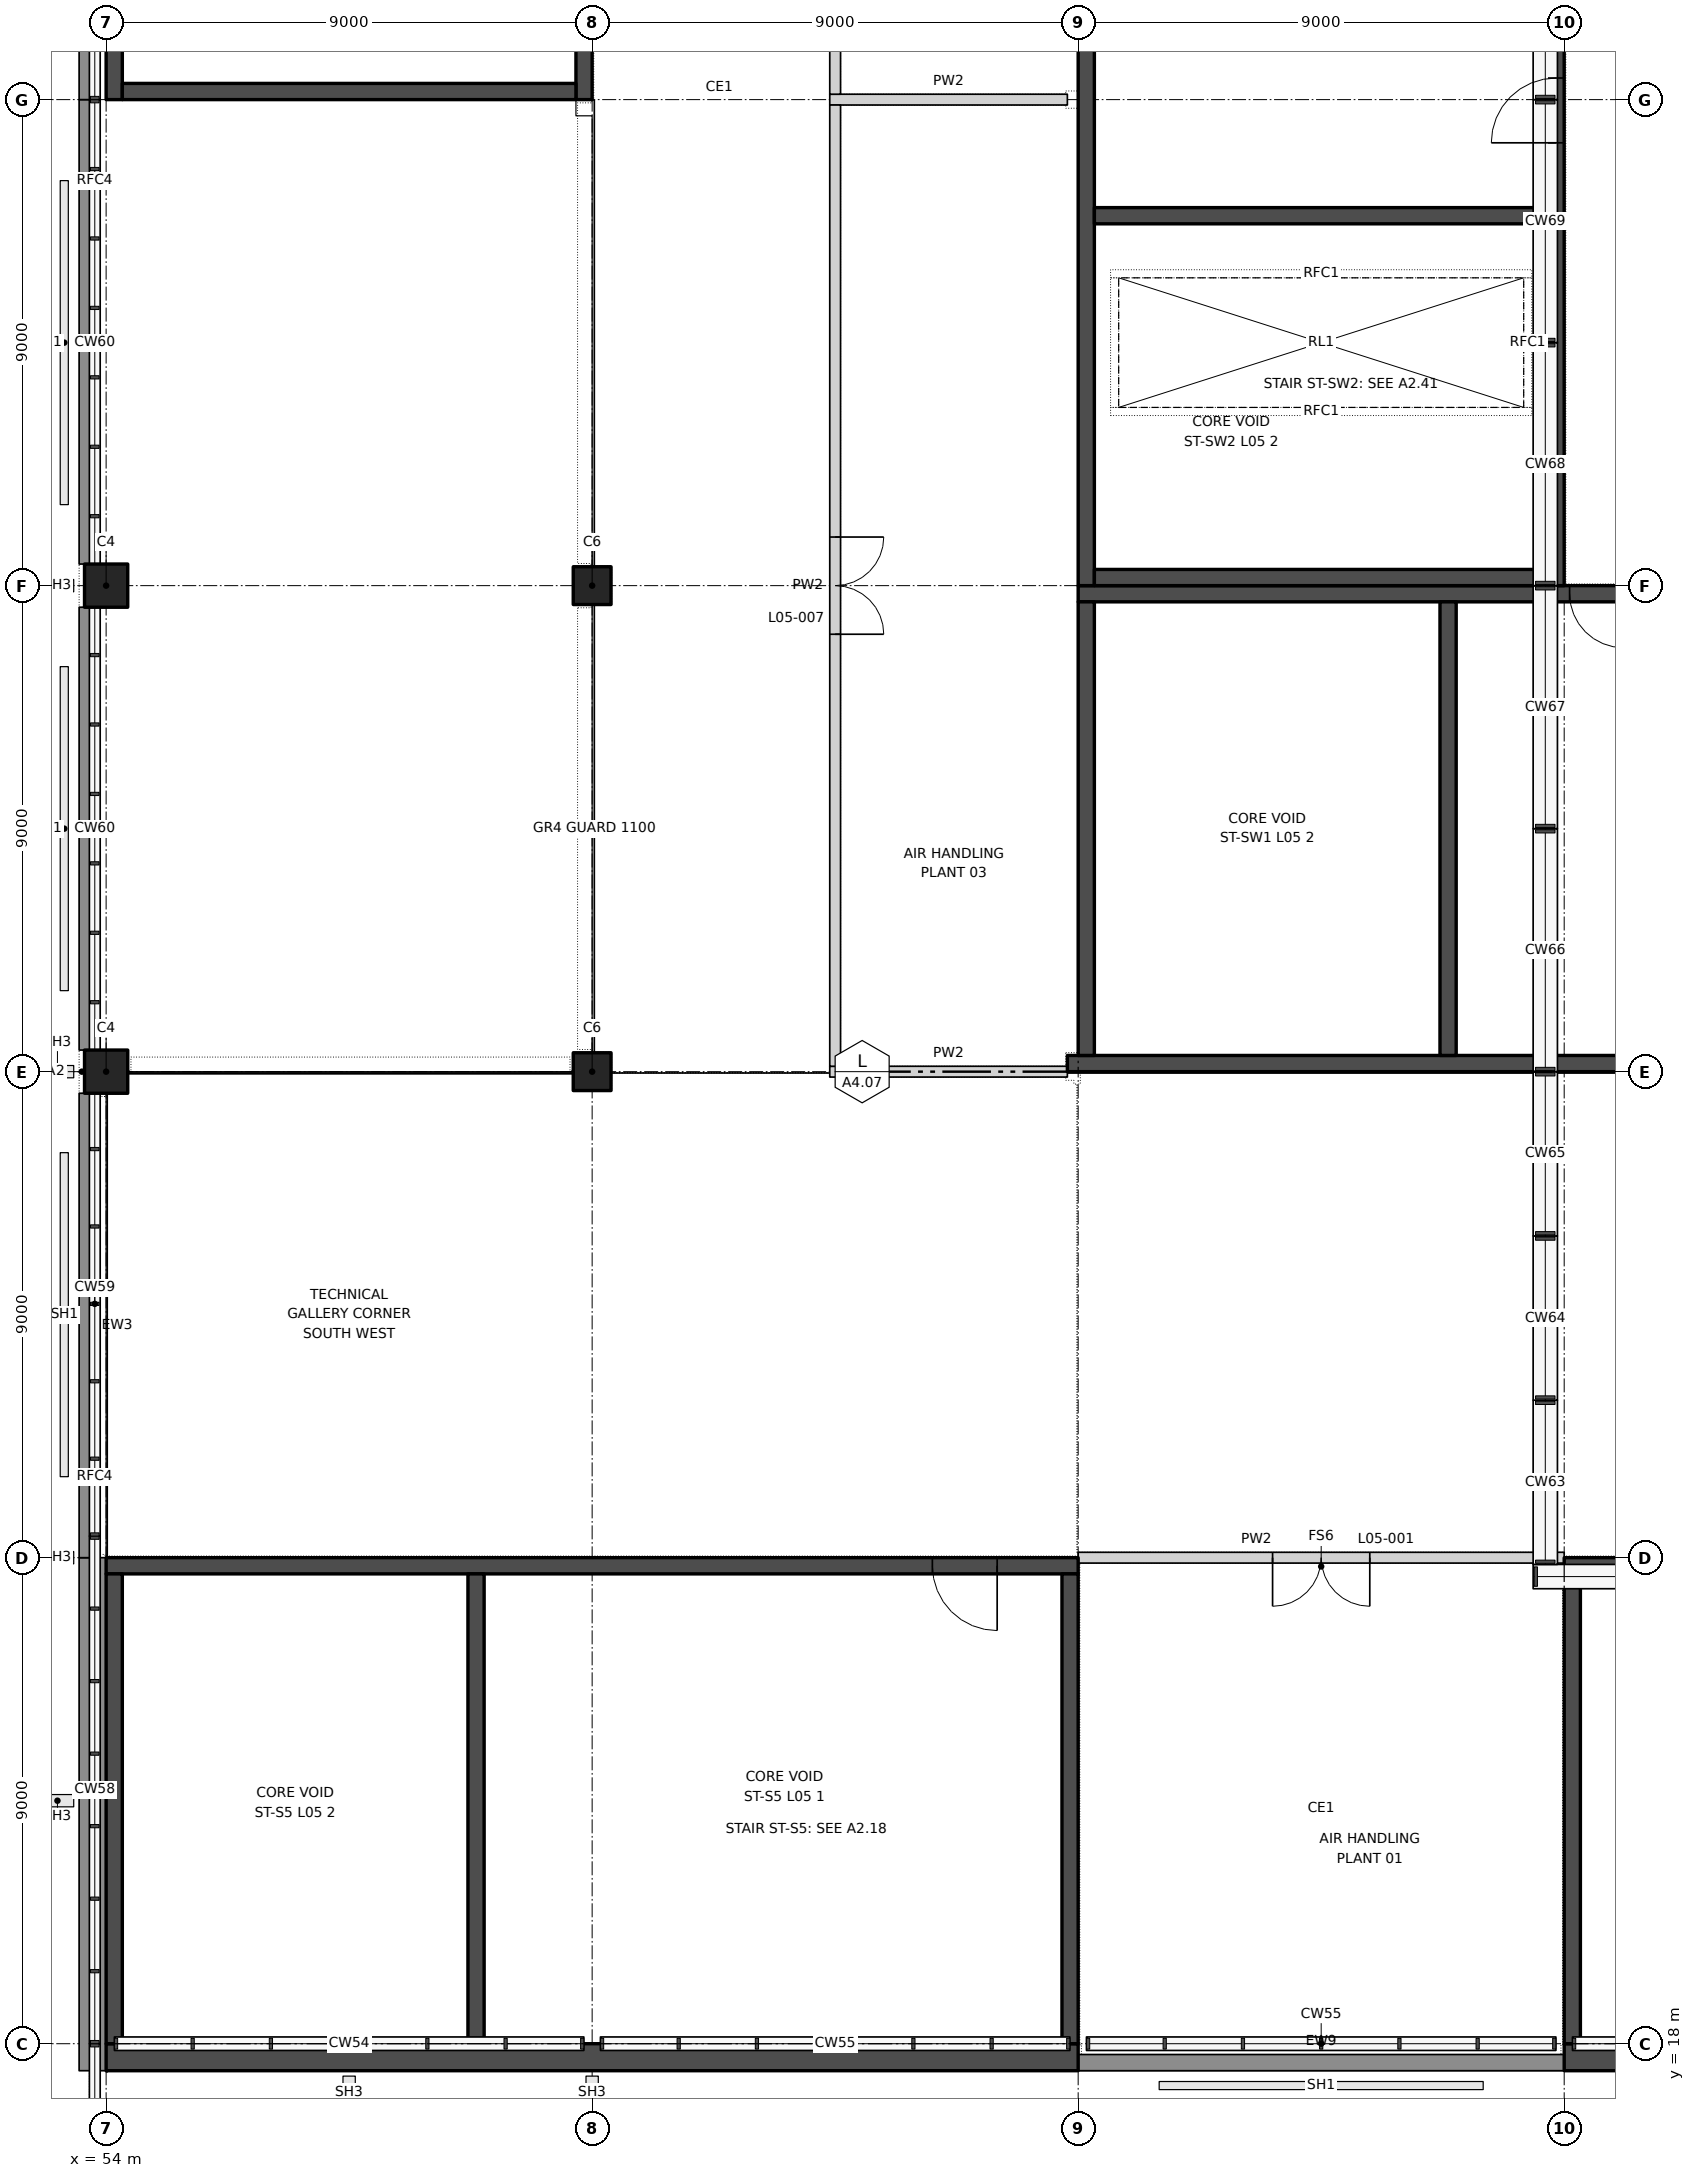
"""IFC4 building model, lengths in metres.
Left out: names, types, materials, properties, quantities, classifications, styles, units other than length and angle.
Written with IfcOpenShell. Run it as: python <this file> out.ifc"""

import sys

from ifc_helpers import new_model, si_unit, direction, frame, frame_2d, origin, origin_2d, place, context, subcontext, project, spatial, rectangle, extrude, element, fill, save


model = new_model("IFC4")
c1 = context("Model", 3, precision=1e-05, world=origin(), true_north=direction((0.0, 1.0)))
c2 = subcontext(c1, "Body", "Model", "MODEL_VIEW")
j1 = project(units=[si_unit("LENGTHUNIT", "METRE"), si_unit("PLANEANGLEUNIT", "RADIAN")], contexts=[c1])
p1 = place(None, origin())
s1 = spatial("IfcSite", under=j1, at=p1, CompositionType="ELEMENT")
p2 = place(p1, origin())
s2 = spatial("IfcBuilding", under=s1, at=p2, CompositionType="ELEMENT")
p3 = place(p2, frame((0.0, 0.0, 33.5)))
s3 = spatial("IfcBuildingStorey", under=s2, at=p3, CompositionType="ELEMENT", Elevation=33.5)
for number, where, z_axis, x_axis in (
    (1, (54.0, 36.0, 0.0), (0.0, 0.0, 1.0), (1.0, 0.0, 0.0)),
    (2, (54.0, 45.0, 0.0), (0.0, 0.0, 1.0), (1.0, 0.0, 0.0)),
):
    element("IfcColumn", number, at=place(p3, frame(where, z_axis=z_axis, x_axis=x_axis)), inside=s3, PredefinedType="COLUMN", context=c2, shape_type="SweptSolid", body=[
        extrude(rectangle(XDim=0.8, YDim=0.8, at=origin_2d()), origin(), (0.0, 0.0, 1.0), 4.0),
    ])
for number, where, z_axis, x_axis in (
    (3, (63.0, 36.0, 0.0), (0.0, 0.0, 1.0), (1.0, 0.0, 0.0)),
    (4, (63.0, 45.0, 0.0), (0.0, 0.0, 1.0), (1.0, 0.0, 0.0)),
):
    element("IfcColumn", number, at=place(p3, frame(where, z_axis=z_axis, x_axis=x_axis)), inside=s3, PredefinedType="COLUMN", context=c2, shape_type="SweptSolid", body=[
        extrude(rectangle(XDim=0.7, YDim=0.7, at=origin_2d()), origin(), (0.0, 0.0, 1.0), 4.0),
    ])
p4 = place(p2, frame((0.0, 0.0, 28.0)))
s4 = spatial("IfcBuildingStorey", under=s2, at=p4, CompositionType="ELEMENT", Elevation=28.0)
p5 = place(p4, frame((54.4, 45.0, 0.0), z_axis=(0.0, 0.0, 1.0), x_axis=(1.0, 0.0, 0.0)))
e5 = element("IfcWall", 5, at=p5, inside=s4, PredefinedType="PARTITIONING", context=c2, shape_type="SweptSolid", body=[
    extrude(rectangle(XDim=8.25, YDim=0.15, at=frame_2d((4.125, 0.0))), origin(), (0.0, 0.0, 1.0), 9.5),
])
p6 = place(p3, frame((72.0, 27.0, 0.0), z_axis=(0.0, 0.0, 1.0), x_axis=(1.0, 0.0, 0.0)))
e6 = element("IfcWall", 6, at=p6, inside=s3, PredefinedType="PARTITIONING", context=c2, shape_type="SweptSolid", body=[
    extrude(rectangle(XDim=9.0, YDim=0.2, at=frame_2d((4.5, 0.0))), origin(), (0.0, 0.0, 1.0), 4.0),
])
p7 = place(p6, frame((3.6, 0.0, 0.0)))
e7 = element("IfcOpeningElement", 7, at=p7, cuts=e6, PredefinedType="OPENING", context=c2, shape_type="SweptSolid", body=[
    extrude(rectangle(XDim=1.8, YDim=2.1, at=frame_2d((0.9, 1.05))), frame((0.0, 0.11, 0.0), z_axis=(0.0, -1.0, 0.0), x_axis=(1.0, 0.0, 0.0)), (0.0, 0.0, 1.0), 0.22),
])
for number, where, z_axis, x_axis in (
    (8, (67.4, 36.0, 0.0), (0.0, 0.0, 1.0), (1.0, 0.0, 0.0)),
    (9, (67.4, 54.0, 0.0), (0.0, 0.0, 1.0), (1.0, 0.0, 0.0)),
):
    element("IfcWall", number, at=place(p3, frame(where, z_axis=z_axis, x_axis=x_axis)), inside=s3, PredefinedType="PARTITIONING", context=c2, shape_type="SweptSolid", body=[
        extrude(rectangle(XDim=4.4, YDim=0.2, at=frame_2d((2.2, 0.0))), origin(), (0.0, 0.0, 1.0), 4.0),
    ])
p8 = place(p3, frame((67.5, 36.1, 0.0), z_axis=(0.0, 0.0, 1.0), x_axis=(0.0, 1.0, 0.0)))
e10 = element("IfcWall", 10, at=p8, inside=s3, PredefinedType="PARTITIONING", context=c2, shape_type="SweptSolid", body=[
    extrude(rectangle(XDim=17.8, YDim=0.2, at=frame_2d((8.9, 0.0))), origin(), (0.0, 0.0, 1.0), 4.0),
])
p9 = place(p8, frame((8.0, 0.0, 0.0)))
e11 = element("IfcOpeningElement", 11, at=p9, cuts=e10, PredefinedType="OPENING", context=c2, shape_type="SweptSolid", body=[
    extrude(rectangle(XDim=1.8, YDim=2.1, at=frame_2d((0.9, 1.05))), frame((0.0, 0.11, 0.0), z_axis=(0.0, -1.0, 0.0), x_axis=(1.0, 0.0, 0.0)), (0.0, 0.0, 1.0), 0.22),
])
p10 = place(p3, frame((67.5, 54.1, 0.0), z_axis=(0.0, 0.0, 1.0), x_axis=(0.0, 1.0, 0.0)))
e12 = element("IfcWall", 12, at=p10, inside=s3, PredefinedType="PARTITIONING", context=c2, shape_type="SweptSolid", body=[
    extrude(rectangle(XDim=4.325, YDim=0.2, at=frame_2d((2.163, 0.0))), origin(), (0.0, 0.0, 1.0), 4.0),
])
p11 = place(p10, frame((1.262, 0.0, 0.0)))
e13 = element("IfcOpeningElement", 13, at=p11, cuts=e12, PredefinedType="OPENING", context=c2, shape_type="SweptSolid", body=[
    extrude(rectangle(XDim=1.8, YDim=2.1, at=frame_2d((0.9, 1.05))), frame((0.0, 0.11, 0.0), z_axis=(0.0, -1.0, 0.0), x_axis=(1.0, 0.0, 0.0)), (0.0, 0.0, 1.0), 0.22),
])
p12 = place(p3, frame((72.0, 17.65, 0.0), z_axis=(0.0, 0.0, 1.0), x_axis=(1.0, 0.0, 0.0)))
e14 = element("IfcWall", 14, at=p12, inside=s3, PredefinedType="SOLIDWALL", context=c2, shape_type="SweptSolid", body=[
    extrude(rectangle(XDim=9.0, YDim=0.3, at=frame_2d((4.5, 0.0))), origin(), (0.0, 0.0, 1.0), 4.0),
])
p13 = place(p3, frame((53.75, 27.0, 0.0), z_axis=(0.0, 0.0, 1.0), x_axis=(0.0, -1.0, 0.0)))
e15 = element("IfcWall", 15, at=p13, inside=s3, PredefinedType="SOLIDWALL", context=c2, shape_type="SweptSolid", body=[
    extrude(rectangle(XDim=9.5, YDim=0.5, at=frame_2d((4.75, 0.0))), origin(), (0.0, 0.0, 1.0), 4.0),
])
p14 = place(p3, frame((53.65, 35.6, 0.0), z_axis=(0.0, 0.0, 1.0), x_axis=(0.0, -1.0, 0.0)))
e16 = element("IfcWall", 16, at=p14, inside=s3, PredefinedType="SOLIDWALL", context=c2, shape_type="SweptSolid", body=[
    extrude(rectangle(XDim=8.6, YDim=0.3, at=frame_2d((4.3, 0.0))), origin(), (0.0, 0.0, 1.0), 4.0),
])
p15 = place(p3, frame((53.65, 44.6, 0.0), z_axis=(0.0, 0.0, 1.0), x_axis=(0.0, -1.0, 0.0)))
e17 = element("IfcWall", 17, at=p15, inside=s3, PredefinedType="SOLIDWALL", context=c2, shape_type="SweptSolid", body=[
    extrude(rectangle(XDim=8.2, YDim=0.3, at=frame_2d((4.1, 0.0))), origin(), (0.0, 0.0, 1.0), 4.0),
])
p16 = place(p3, frame((53.65, 54.0, 0.0), z_axis=(0.0, 0.0, 1.0), x_axis=(0.0, -1.0, 0.0)))
e18 = element("IfcWall", 18, at=p16, inside=s3, PredefinedType="SOLIDWALL", context=c2, shape_type="SweptSolid", body=[
    extrude(rectangle(XDim=8.6, YDim=0.3, at=frame_2d((4.3, 0.0))), origin(), (0.0, 0.0, 1.0), 4.0),
])
p17 = place(p3, frame((53.675, 63.0, 0.0), z_axis=(0.0, 0.0, 1.0), x_axis=(0.0, -1.0, 0.0)))
e19 = element("IfcWall", 19, at=p17, inside=s3, PredefinedType="SOLIDWALL", context=c2, shape_type="SweptSolid", body=[
    extrude(rectangle(XDim=9.0, YDim=0.35, at=frame_2d((4.5, 0.0))), origin(), (0.0, 0.0, 1.0), 4.0),
])
p18 = place(p3, frame((81.0, 26.85, 0.0), z_axis=(0.0, 0.0, 1.0), x_axis=(1.0, 0.0, 0.0)))
e20 = element("IfcWall", 20, at=p18, inside=s3, PredefinedType="SHEAR", context=c2, shape_type="SweptSolid", body=[
    extrude(rectangle(XDim=18.0, YDim=0.3, at=frame_2d((9.0, 0.0))), origin(), (0.0, 0.0, 1.0), 4.0),
])
p19 = place(p18, frame((1.5, 0.0, 0.0)))
e21 = element("IfcOpeningElement", 21, at=p19, cuts=e20, PredefinedType="OPENING", context=c2, shape_type="SweptSolid", body=[
    extrude(rectangle(XDim=1.2, YDim=2.1, at=frame_2d((0.6, 1.05))), frame((0.0, 0.16, 0.0), z_axis=(0.0, -1.0, 0.0), x_axis=(1.0, 0.0, 0.0)), (0.0, 0.0, 1.0), 0.32),
])
p20 = place(p3, frame((81.0, 17.75, 0.0), z_axis=(0.0, 0.0, 1.0), x_axis=(1.0, 0.0, 0.0)))
e22 = element("IfcWall", 22, at=p20, inside=s3, PredefinedType="SHEAR", context=c2, shape_type="SweptSolid", body=[
    extrude(rectangle(XDim=18.0, YDim=0.5, at=frame_2d((9.0, 0.0))), origin(), (0.0, 0.0, 1.0), 4.0),
])
p21 = place(p3, frame((81.15, 26.7, 0.0), z_axis=(0.0, 0.0, 1.0), x_axis=(0.0, -1.0, 0.0)))
e23 = element("IfcWall", 23, at=p21, inside=s3, PredefinedType="SHEAR", context=c2, shape_type="SweptSolid", body=[
    extrude(rectangle(XDim=8.7, YDim=0.3, at=frame_2d((4.35, 0.0))), origin(), (0.0, 0.0, 1.0), 4.0),
])
p22 = place(p3, frame((72.0, 26.85, 0.0), z_axis=(0.0, 0.0, 1.0), x_axis=(-1.0, 0.0, 0.0)))
e24 = element("IfcWall", 24, at=p22, inside=s3, PredefinedType="SHEAR", context=c2, shape_type="SweptSolid", body=[
    extrude(rectangle(XDim=18.0, YDim=0.3, at=frame_2d((9.0, 0.0))), origin(), (0.0, 0.0, 1.0), 4.0),
])
p23 = place(p22, frame((1.5, 0.0, 0.0)))
e25 = element("IfcOpeningElement", 25, at=p23, cuts=e24, PredefinedType="OPENING", context=c2, shape_type="SweptSolid", body=[
    extrude(rectangle(XDim=1.2, YDim=2.1, at=frame_2d((0.6, 1.05))), frame((0.0, 0.16, 0.0), z_axis=(0.0, -1.0, 0.0), x_axis=(1.0, 0.0, 0.0)), (0.0, 0.0, 1.0), 0.32),
])
p24 = place(p3, frame((72.0, 17.75, 0.0), z_axis=(0.0, 0.0, 1.0), x_axis=(-1.0, 0.0, 0.0)))
e26 = element("IfcWall", 26, at=p24, inside=s3, PredefinedType="SHEAR", context=c2, shape_type="SweptSolid", body=[
    extrude(rectangle(XDim=18.0, YDim=0.5, at=frame_2d((9.0, 0.0))), origin(), (0.0, 0.0, 1.0), 4.0),
])
for number, where, z_axis, x_axis in (
    (27, (71.85, 26.7, 0.0), (0.0, 0.0, 1.0), (0.0, -1.0, 0.0)),
    (28, (54.15, 26.7, 0.0), (0.0, 0.0, 1.0), (0.0, -1.0, 0.0)),
    (29, (60.85, 26.7, 0.0), (0.0, 0.0, 1.0), (0.0, -1.0, 0.0)),
):
    element("IfcWall", number, at=place(p3, frame(where, z_axis=z_axis, x_axis=x_axis)), inside=s3, PredefinedType="SHEAR", context=c2, shape_type="SweptSolid", body=[
        extrude(rectangle(XDim=8.7, YDim=0.3, at=frame_2d((4.35, 0.0))), origin(), (0.0, 0.0, 1.0), 4.0),
    ])
p25 = place(p3, frame((62.85, 54.0, 0.0), z_axis=(0.0, 0.0, 1.0), x_axis=(0.0, 1.0, 0.0)))
e30 = element("IfcWall", 30, at=p25, inside=s3, PredefinedType="SHEAR", context=c2, shape_type="SweptSolid", body=[
    extrude(rectangle(XDim=18.0, YDim=0.3, at=frame_2d((9.0, 0.0))), origin(), (0.0, 0.0, 1.0), 4.0),
])
p26 = place(p25, frame((8.6, 0.0, 0.0)))
e31 = element("IfcOpeningElement", 31, at=p26, cuts=e30, PredefinedType="OPENING", context=c2, shape_type="SweptSolid", body=[
    extrude(rectangle(XDim=1.2, YDim=2.1, at=frame_2d((0.6, 1.05))), frame((0.0, 0.16, 0.0), z_axis=(0.0, -1.0, 0.0), x_axis=(1.0, 0.0, 0.0)), (0.0, 0.0, 1.0), 0.32),
])
p27 = place(p3, frame((54.15, 54.0, 0.0), z_axis=(0.0, 0.0, 1.0), x_axis=(0.0, 1.0, 0.0)))
e32 = element("IfcWall", 32, at=p27, inside=s3, PredefinedType="SHEAR", context=c2, shape_type="SweptSolid", body=[
    extrude(rectangle(XDim=18.0, YDim=0.3, at=frame_2d((9.0, 0.0))), origin(), (0.0, 0.0, 1.0), 4.0),
])
p28 = place(p3, frame((62.7, 54.15, 0.0), z_axis=(0.0, 0.0, 1.0), x_axis=(-1.0, 0.0, 0.0)))
e33 = element("IfcWall", 33, at=p28, inside=s3, PredefinedType="SHEAR", context=c2, shape_type="SweptSolid", body=[
    extrude(rectangle(XDim=8.4, YDim=0.3, at=frame_2d((4.2, 0.0))), origin(), (0.0, 0.0, 1.0), 4.0),
])
p29 = place(p3, frame((90.0, 44.85, 0.0), z_axis=(0.0, 0.0, 1.0), x_axis=(-1.0, 0.0, 0.0)))
e34 = element("IfcWall", 34, at=p29, inside=s3, PredefinedType="SHEAR", context=c2, shape_type="SweptSolid", body=[
    extrude(rectangle(XDim=18.0, YDim=0.3, at=frame_2d((9.0, 0.0))), origin(), (0.0, 0.0, 1.0), 4.0),
])
p30 = place(p29, frame((7.9, 0.0, 0.0)))
e35 = element("IfcOpeningElement", 35, at=p30, cuts=e34, PredefinedType="OPENING", context=c2, shape_type="SweptSolid", body=[
    extrude(rectangle(XDim=1.0, YDim=2.1, at=frame_2d((0.5, 1.05))), frame((0.0, 0.16, 0.0), z_axis=(0.0, -1.0, 0.0), x_axis=(1.0, 0.0, 0.0)), (0.0, 0.0, 1.0), 0.32),
])
p31 = place(p3, frame((90.0, 36.15, 0.0), z_axis=(0.0, 0.0, 1.0), x_axis=(-1.0, 0.0, 0.0)))
e36 = element("IfcWall", 36, at=p31, inside=s3, PredefinedType="SHEAR", context=c2, shape_type="SweptSolid", body=[
    extrude(rectangle(XDim=18.2, YDim=0.3, at=frame_2d((9.1, 0.0))), origin(), (0.0, 0.0, 1.0), 4.0),
])
for number, where, z_axis, x_axis in (
    (37, (72.15, 44.7, 0.0), (0.0, 0.0, 1.0), (0.0, -1.0, 0.0)),
    (38, (78.85, 44.7, 0.0), (0.0, 0.0, 1.0), (0.0, -1.0, 0.0)),
):
    element("IfcWall", number, at=place(p3, frame(where, z_axis=z_axis, x_axis=x_axis)), inside=s3, PredefinedType="SHEAR", context=c2, shape_type="SweptSolid", body=[
        extrude(rectangle(XDim=8.4, YDim=0.3, at=frame_2d((4.2, 0.0))), origin(), (0.0, 0.0, 1.0), 4.0),
    ])
p32 = place(p3, frame((80.85, 63.0, 0.0), z_axis=(0.0, 0.0, 1.0), x_axis=(0.0, -1.0, 0.0)))
e39 = element("IfcWall", 39, at=p32, inside=s3, PredefinedType="SHEAR", context=c2, shape_type="SweptSolid", body=[
    extrude(rectangle(XDim=18.0, YDim=0.3, at=frame_2d((9.0, 0.0))), origin(), (0.0, 0.0, 1.0), 4.0),
])
p33 = place(p32, frame((8.6, 0.0, 0.0)))
e40 = element("IfcOpeningElement", 40, at=p33, cuts=e39, PredefinedType="OPENING", context=c2, shape_type="SweptSolid", body=[
    extrude(rectangle(XDim=1.2, YDim=2.1, at=frame_2d((0.6, 1.05))), frame((0.0, 0.16, 0.0), z_axis=(0.0, -1.0, 0.0), x_axis=(1.0, 0.0, 0.0)), (0.0, 0.0, 1.0), 0.32),
])
p34 = place(p3, frame((72.15, 63.0, 0.0), z_axis=(0.0, 0.0, 1.0), x_axis=(0.0, -1.0, 0.0)))
e41 = element("IfcWall", 41, at=p34, inside=s3, PredefinedType="SHEAR", context=c2, shape_type="SweptSolid", body=[
    extrude(rectangle(XDim=18.0, YDim=0.3, at=frame_2d((9.0, 0.0))), origin(), (0.0, 0.0, 1.0), 4.0),
])
for number, where, z_axis, x_axis in (
    (42, (80.7, 45.15, 0.0), (0.0, 0.0, 1.0), (-1.0, 0.0, 0.0)),
    (43, (80.7, 51.85, 0.0), (0.0, 0.0, 1.0), (-1.0, 0.0, 0.0)),
):
    element("IfcWall", number, at=place(p3, frame(where, z_axis=z_axis, x_axis=x_axis)), inside=s3, PredefinedType="SHEAR", context=c2, shape_type="SweptSolid", body=[
        extrude(rectangle(XDim=8.4, YDim=0.3, at=frame_2d((4.2, 0.0))), origin(), (0.0, 0.0, 1.0), 4.0),
    ])
p35 = place(p7, frame((1.8, 0.0, 0.0), z_axis=(0.0, 0.0, 1.0), x_axis=(-1.0, 0.0, 0.0)))
e44 = element("IfcDoor", 44, at=p35, inside=s3, OperationType="DOUBLE_DOOR_DOUBLE_SWING", PredefinedType="DOOR", context=c2, shape_type="SweptSolid", body=[
    extrude(rectangle(XDim=1.8, YDim=2.1, at=frame_2d((0.9, 1.05))), frame((0.0, 0.025, 0.0), z_axis=(0.0, -1.0, 0.0), x_axis=(1.0, 0.0, 0.0)), (0.0, 0.0, 1.0), 0.05),
])
fill(e7, e44)
p36 = place(p9, frame((1.8, 0.0, 0.0), z_axis=(0.0, 0.0, 1.0), x_axis=(-1.0, 0.0, 0.0)))
e45 = element("IfcDoor", 45, at=p36, inside=s3, OperationType="DOUBLE_DOOR_DOUBLE_SWING", PredefinedType="DOOR", context=c2, shape_type="SweptSolid", body=[
    extrude(rectangle(XDim=1.8, YDim=2.1, at=frame_2d((0.9, 1.05))), frame((0.0, 0.025, 0.0), z_axis=(0.0, -1.0, 0.0), x_axis=(1.0, 0.0, 0.0)), (0.0, 0.0, 1.0), 0.05),
])
fill(e11, e45)
p37 = place(p23, origin())
e46 = element("IfcDoor", 46, at=p37, inside=s3, OperationType="SINGLE_SWING_LEFT", PredefinedType="DOOR", context=c2, shape_type="SweptSolid", body=[
    extrude(rectangle(XDim=1.2, YDim=2.1, at=frame_2d((0.6, 1.05))), frame((0.0, 0.025, 0.0), z_axis=(0.0, -1.0, 0.0), x_axis=(1.0, 0.0, 0.0)), (0.0, 0.0, 1.0), 0.05),
])
fill(e25, e46)
p38 = place(p30, origin())
e47 = element("IfcDoor", 47, at=p38, inside=s3, OperationType="SINGLE_SWING_LEFT", PredefinedType="DOOR", context=c2, shape_type="SweptSolid", body=[
    extrude(rectangle(XDim=1.0, YDim=2.1, at=frame_2d((0.5, 1.05))), frame((0.0, 0.025, 0.0), z_axis=(0.0, -1.0, 0.0), x_axis=(1.0, 0.0, 0.0)), (0.0, 0.0, 1.0), 0.05),
])
fill(e35, e47)
p39 = place(p33, frame((1.2, 0.0, 0.0), z_axis=(0.0, 0.0, 1.0), x_axis=(-1.0, 0.0, 0.0)))
e48 = element("IfcDoor", 48, at=p39, inside=s3, OperationType="SINGLE_SWING_LEFT", PredefinedType="DOOR", context=c2, shape_type="SweptSolid", body=[
    extrude(rectangle(XDim=1.2, YDim=2.1, at=frame_2d((0.6, 1.05))), frame((0.0, 0.025, 0.0), z_axis=(0.0, -1.0, 0.0), x_axis=(1.0, 0.0, 0.0)), (0.0, 0.0, 1.0), 0.05),
])
fill(e40, e48)
p40 = place(p2, frame((0.0, 0.0, 47.1)))
p41 = place(p40, frame((0.0, 0.0, -0.3)))
p42 = place(p41, frame((76.5, 49.5, 0.0)))
p43 = place(p42, frame((0.0, 0.0, 0.25)))
e49 = element("IfcWindow", 49, at=p43, inside=s3, PartitioningType="SINGLE_PANEL", PredefinedType="SKYLIGHT", context=c2, shape_type="SweptSolid", body=[
    extrude(rectangle(XDim=7.5, YDim=2.4, at=origin_2d()), origin(), (0.0, 0.0, 1.0), 0.05),
])
save(model, sys.argv[1])
